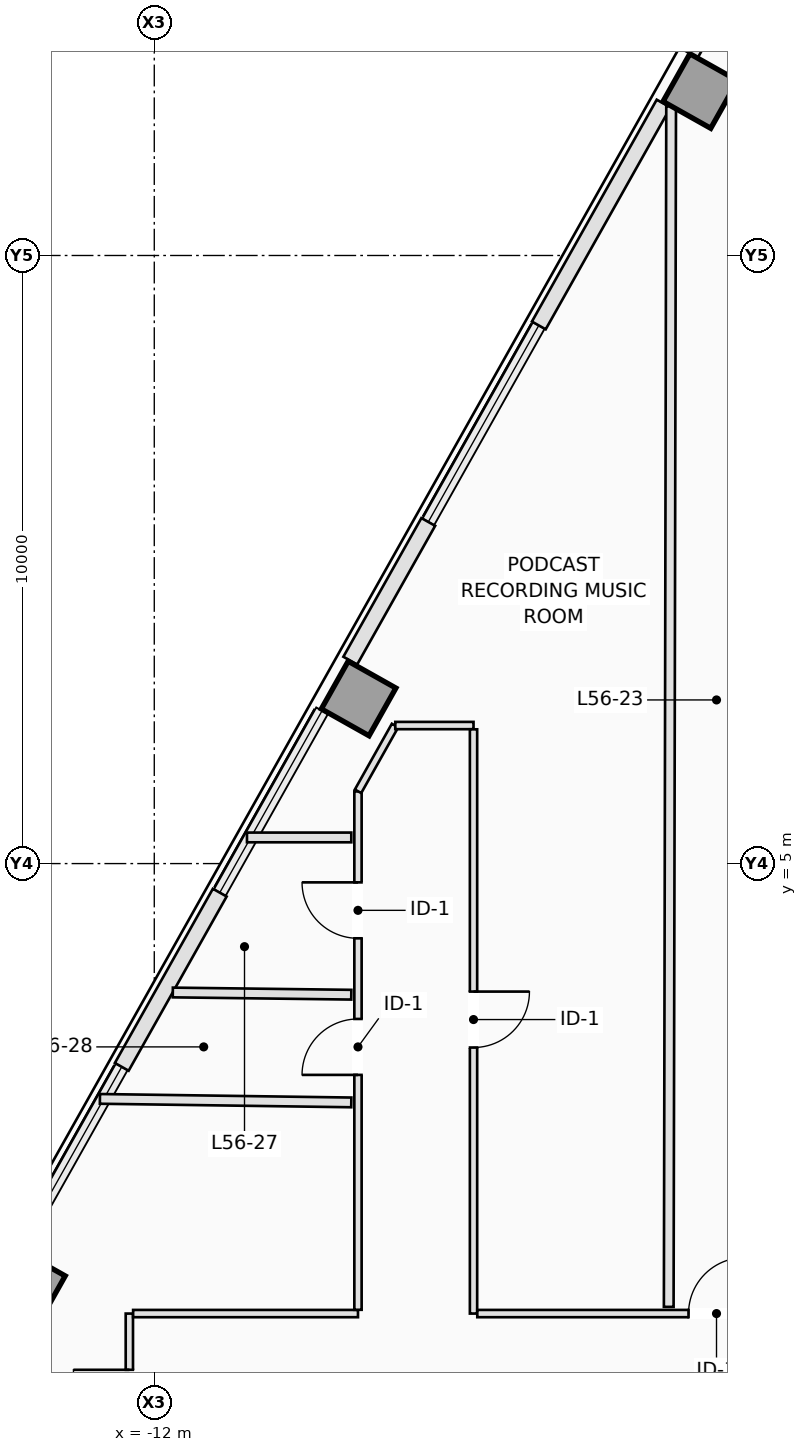
"""IFC4 building model, lengths in metres.
Left out: names, types, materials, properties, quantities, classifications, styles, units other than length and angle.
Written with IfcOpenShell. Run it as: python <this file> out.ifc"""

import sys

from ifc_helpers import new_model, si_unit, direction, frame, frame_2d, origin, origin_2d, place, context, subcontext, project, spatial, rectangle, extrude, element, fill, save


model = new_model("IFC4")
c1 = context("Model", 3, precision=1e-05, world=origin(), true_north=direction((0.0, 1.0)))
c2 = subcontext(c1, "Body", "Model", "MODEL_VIEW")
j1 = project(units=[si_unit("LENGTHUNIT", "METRE"), si_unit("PLANEANGLEUNIT", "RADIAN")], contexts=[c1])
p1 = place(None, origin())
s1 = spatial("IfcSite", under=j1, at=p1, CompositionType="ELEMENT")
p2 = place(p1, origin())
s2 = spatial("IfcBuilding", under=s1, at=p2, CompositionType="ELEMENT")
p3 = place(p2, frame((0.0, 0.0, 204.4)))
s3 = spatial("IfcBuildingStorey", under=s2, at=p3, CompositionType="ELEMENT", Elevation=204.4)
for number, where, z_axis, x_axis in (
    (1, (-3.021, 17.704, 0.0), (0.0, 0.0, 1.0), (-0.872, 0.49, 0.0)),
    (2, (-8.64, 7.715, 0.0), (0.0, 0.0, 1.0), (-0.872, 0.49, 0.0)),
    (3, (-14.077, -1.952, 0.0), (0.0, 0.0, 1.0), (-0.872, 0.49, 0.0)),
):
    element("IfcColumn", number, at=place(p3, frame(where, z_axis=z_axis, x_axis=x_axis)), inside=s3, PredefinedType="COLUMN", context=c2, shape_type="SweptSolid", body=[
        extrude(rectangle(XDim=0.9, YDim=0.9, at=origin_2d()), origin(), (0.0, 0.0, 1.0), 3.5),
    ])
p4 = place(p3, frame((-3.168, 18.309, 0.0), z_axis=(0.0, 0.0, 1.0), x_axis=(0.490345412687, 0.87152818443, 0.0)))
e4 = element("IfcWall", 4, at=p4, inside=s3, PredefinedType="STANDARD", context=c2, shape_type="SweptSolid", body=[
    extrude(rectangle(XDim=0.964, YDim=0.24, at=frame_2d((0.482, 0.0))), origin(), (0.0, 0.0, 1.0), 3.25),
])
p5 = place(p3, frame((-8.777, 8.337, 0.0), z_axis=(0.0, 0.0, 1.0), x_axis=(0.490301099378, 0.871553114818, 0.0)))
e5 = element("IfcWall", 5, at=p5, inside=s3, PredefinedType="STANDARD", context=c2, shape_type="SweptSolid", body=[
    extrude(rectangle(XDim=2.617, YDim=0.26, at=frame_2d((1.309, 0.0))), origin(), (0.0, 0.0, 1.0), 3.25),
])
p6 = place(p3, frame((-5.677, 13.85, 0.0), z_axis=(0.0, 0.0, 1.0), x_axis=(0.490275081837, 0.87156775074, 0.0)))
e6 = element("IfcWall", 6, at=p6, inside=s3, PredefinedType="STANDARD", context=c2, shape_type="SweptSolid", body=[
    extrude(rectangle(XDim=4.187, YDim=0.26, at=frame_2d((2.094, 0.0))), origin(), (0.0, 0.0, 1.0), 3.25),
])
p7 = place(p3, frame((-12.535, 1.657, 0.0), z_axis=(0.0, 0.0, 1.0), x_axis=(0.490264765862, 0.871573553611, 0.0)))
e7 = element("IfcWall", 7, at=p7, inside=s3, PredefinedType="STANDARD", context=c2, shape_type="SweptSolid", body=[
    extrude(rectangle(XDim=3.287, YDim=0.26, at=frame_2d((1.644, 0.0))), origin(), (0.0, 0.0, 1.0), 3.25),
])
p8 = place(p3, frame((-12.41, -5.073, 0.0), z_axis=(0.0, 0.0, 1.0), x_axis=(0.0, 1.0, 0.0)))
e8 = element("IfcWall", 8, at=p8, inside=s3, PredefinedType="PARTITIONING", context=c2, shape_type="SweptSolid", body=[
    extrude(rectangle(XDim=2.673, YDim=0.12, at=frame_2d((1.336, 0.0))), origin(), (0.0, 0.0, 1.0), 3.25),
])
p9 = place(p8, frame((0.828, 0.0, 0.0)))
e9 = element("IfcOpeningElement", 9, at=p9, cuts=e8, PredefinedType="OPENING", context=c2, shape_type="SweptSolid", body=[
    extrude(rectangle(XDim=0.92, YDim=2.12, at=frame_2d((0.46, 1.06))), frame((0.0, 0.07, 0.0), z_axis=(0.0, -1.0, 0.0), x_axis=(1.0, 0.0, 0.0)), (0.0, 0.0, 1.0), 0.14),
])
p10 = place(p3, frame((-12.348, -2.4, 0.0), z_axis=(0.0, 0.0, 1.0), x_axis=(1.0, 0.0, 0.0)))
e10 = element("IfcWall", 10, at=p10, inside=s3, PredefinedType="PARTITIONING", context=c2, shape_type="SweptSolid", body=[
    extrude(rectangle(XDim=3.698, YDim=0.12, at=frame_2d((1.849, 0.0))), origin(), (0.0, 0.0, 1.0), 3.25),
])
p11 = place(p3, frame((-8.65, -2.338, 0.0), z_axis=(0.0, 0.0, 1.0), x_axis=(0.0, 1.0, 0.0)))
e11 = element("IfcWall", 11, at=p11, inside=s3, PredefinedType="PARTITIONING", context=c2, shape_type="SweptSolid", body=[
    extrude(rectangle(XDim=8.525, YDim=0.12, at=frame_2d((4.262, 0.0))), origin(), (0.0, 0.0, 1.0), 3.25),
])
p12 = place(p11, frame((6.109, 0.0, 0.0)))
e12 = element("IfcOpeningElement", 12, at=p12, cuts=e11, PredefinedType="OPENING", context=c2, shape_type="SweptSolid", body=[
    extrude(rectangle(XDim=0.92, YDim=2.12, at=frame_2d((0.46, 1.06))), frame((0.0, 0.07, 0.0), z_axis=(0.0, -1.0, 0.0), x_axis=(1.0, 0.0, 0.0)), (0.0, 0.0, 1.0), 0.14),
])
p13 = place(p11, frame((3.863, 0.0, 0.0)))
e13 = element("IfcOpeningElement", 13, at=p13, cuts=e11, PredefinedType="OPENING", context=c2, shape_type="SweptSolid", body=[
    extrude(rectangle(XDim=0.92, YDim=2.12, at=frame_2d((0.46, 1.06))), frame((0.0, 0.07, 0.0), z_axis=(0.0, -1.0, 0.0), x_axis=(1.0, 0.0, 0.0)), (0.0, 0.0, 1.0), 0.14),
])
p14 = place(p3, frame((-8.649, 6.189, 0.0), z_axis=(0.0, 0.0, 1.0), x_axis=(0.490298618985, 0.871554510183, 0.0)))
e14 = element("IfcWall", 14, at=p14, inside=s3, PredefinedType="PARTITIONING", context=c2, shape_type="SweptSolid", body=[
    extrude(rectangle(XDim=1.24, YDim=0.12, at=frame_2d((0.62, 0.0))), origin(), (0.0, 0.0, 1.0), 3.25),
])
p15 = place(p3, frame((-8.037, 7.27, 0.0), z_axis=(0.0, 0.0, 1.0), x_axis=(1.0, 0.0, 0.0)))
e15 = element("IfcWall", 15, at=p15, inside=s3, PredefinedType="PARTITIONING", context=c2, shape_type="SweptSolid", body=[
    extrude(rectangle(XDim=1.287, YDim=0.12, at=frame_2d((0.643, 0.0))), origin(), (0.0, 0.0, 1.0), 3.25),
])
p16 = place(p3, frame((-6.75, 7.208, 0.0), z_axis=(0.0, 0.0, 1.0), x_axis=(0.0, -1.0, 0.0)))
e16 = element("IfcWall", 16, at=p16, inside=s3, PredefinedType="PARTITIONING", context=c2, shape_type="SweptSolid", body=[
    extrude(rectangle(XDim=9.608, YDim=0.12, at=frame_2d((4.804, 0.0))), origin(), (0.0, 0.0, 1.0), 3.25),
])
p17 = place(p16, frame((4.313, 0.0, 0.0)))
e17 = element("IfcOpeningElement", 17, at=p17, cuts=e16, PredefinedType="OPENING", context=c2, shape_type="SweptSolid", body=[
    extrude(rectangle(XDim=0.92, YDim=2.12, at=frame_2d((0.46, 1.06))), frame((0.0, 0.07, 0.0), z_axis=(0.0, -1.0, 0.0), x_axis=(1.0, 0.0, 0.0)), (0.0, 0.0, 1.0), 0.14),
])
p18 = place(p3, frame((-6.688, -2.4, 0.0), z_axis=(0.0, 0.0, 1.0), x_axis=(1.0, 0.0, 0.0)))
e18 = element("IfcWall", 18, at=p18, inside=s3, PredefinedType="PARTITIONING", context=c2, shape_type="SweptSolid", body=[
    extrude(rectangle(XDim=7.926, YDim=0.12, at=frame_2d((3.963, 0.0))), origin(), (0.0, 0.0, 1.0), 2.943),
])
p19 = place(p18, frame((3.474, 0.0, 0.0)))
e19 = element("IfcOpeningElement", 19, at=p19, cuts=e18, PredefinedType="OPENING", context=c2, shape_type="SweptSolid", body=[
    extrude(rectangle(XDim=0.92, YDim=2.12, at=frame_2d((0.46, 1.06))), frame((0.0, 0.07, 0.0), z_axis=(0.0, -1.0, 0.0), x_axis=(1.0, 0.0, 0.0)), (0.0, 0.0, 1.0), 0.14),
])
p20 = place(p18, frame((5.854, 0.0, 0.0)))
e20 = element("IfcOpeningElement", 20, at=p20, cuts=e18, PredefinedType="OPENING", context=c2, shape_type="SweptSolid", body=[
    extrude(rectangle(XDim=0.92, YDim=2.12, at=frame_2d((0.46, 1.06))), frame((0.0, 0.07, 0.0), z_axis=(0.0, -1.0, 0.0), x_axis=(1.0, 0.0, 0.0)), (0.0, 0.0, 1.0), 0.14),
])
p21 = place(p3, frame((-3.54, -2.29, 0.0), z_axis=(0.0, 0.0, 1.0), x_axis=(0.002003012872, 0.999997993968, 0.0)))
e21 = element("IfcWall", 21, at=p21, inside=s3, PredefinedType="PARTITIONING", context=c2, shape_type="SweptSolid", body=[
    extrude(rectangle(XDim=19.746, YDim=0.16, at=frame_2d((9.873, 0.0))), origin(), (0.0, 0.0, 1.0), 2.722),
])
p22 = place(p3, frame((-8.76, 5.43, 0.0), z_axis=(0.0, 0.0, 1.0), x_axis=(-1.0, 0.0, 0.0)))
e22 = element("IfcWall", 22, at=p22, inside=s3, PredefinedType="PARTITIONING", context=c2, shape_type="SweptSolid", body=[
    extrude(rectangle(XDim=1.716, YDim=0.16, at=frame_2d((0.858, 0.0))), origin(), (0.0, 0.0, 1.0), 3.25),
])
p23 = place(p3, frame((-8.76, 2.844, 0.0), z_axis=(0.0, 0.0, 1.0), x_axis=(-0.999923216691, 0.012391962013, 0.0)))
e23 = element("IfcWall", 23, at=p23, inside=s3, PredefinedType="PARTITIONING", context=c2, shape_type="SweptSolid", body=[
    extrude(rectangle(XDim=2.936, YDim=0.16, at=frame_2d((1.468, 0.0))), origin(), (0.0, 0.0, 1.0), 3.25),
])
p24 = place(p3, frame((-8.76, 1.073, 0.0), z_axis=(0.0, 0.0, 1.0), x_axis=(-0.999901237572, 0.014054006646, 0.0)))
e24 = element("IfcWall", 24, at=p24, inside=s3, PredefinedType="PARTITIONING", context=c2, shape_type="SweptSolid", body=[
    extrude(rectangle(XDim=4.135, YDim=0.16, at=frame_2d((2.067, 0.0))), origin(), (0.0, 0.0, 1.0), 3.25),
])
p25 = place(p19, origin())
e25 = element("IfcDoor", 25, at=p25, inside=s3, OperationType="SINGLE_SWING_RIGHT", PredefinedType="DOOR", context=c2, shape_type="SweptSolid", body=[
    extrude(rectangle(XDim=0.92, YDim=2.12, at=frame_2d((0.46, 1.06))), frame((0.0, 0.025, 0.0), z_axis=(0.0, -1.0, 0.0), x_axis=(1.0, 0.0, 0.0)), (0.0, 0.0, 1.0), 0.05),
])
fill(e19, e25)
p26 = place(p17, origin())
e26 = element("IfcDoor", 26, at=p26, inside=s3, OperationType="SINGLE_SWING_LEFT", PredefinedType="DOOR", context=c2, shape_type="SweptSolid", body=[
    extrude(rectangle(XDim=0.92, YDim=2.12, at=frame_2d((0.46, 1.06))), frame((0.0, 0.025, 0.0), z_axis=(0.0, -1.0, 0.0), x_axis=(1.0, 0.0, 0.0)), (0.0, 0.0, 1.0), 0.05),
])
fill(e17, e26)
p27 = place(p12, origin())
e27 = element("IfcDoor", 27, at=p27, inside=s3, OperationType="SINGLE_SWING_RIGHT", PredefinedType="DOOR", context=c2, shape_type="SweptSolid", body=[
    extrude(rectangle(XDim=0.92, YDim=2.12, at=frame_2d((0.46, 1.06))), frame((0.0, 0.025, 0.0), z_axis=(0.0, -1.0, 0.0), x_axis=(1.0, 0.0, 0.0)), (0.0, 0.0, 1.0), 0.05),
])
fill(e12, e27)
p28 = place(p13, origin())
e28 = element("IfcDoor", 28, at=p28, inside=s3, OperationType="SINGLE_SWING_LEFT", PredefinedType="DOOR", context=c2, shape_type="SweptSolid", body=[
    extrude(rectangle(XDim=0.92, YDim=2.12, at=frame_2d((0.46, 1.06))), frame((0.0, 0.025, 0.0), z_axis=(0.0, -1.0, 0.0), x_axis=(1.0, 0.0, 0.0)), (0.0, 0.0, 1.0), 0.05),
])
fill(e13, e28)
p29 = place(p9, origin())
e29 = element("IfcDoor", 29, at=p29, inside=s3, OperationType="SINGLE_SWING_RIGHT", PredefinedType="DOOR", context=c2, shape_type="SweptSolid", body=[
    extrude(rectangle(XDim=0.92, YDim=2.12, at=frame_2d((0.46, 1.06))), frame((0.0, 0.025, 0.0), z_axis=(0.0, -1.0, 0.0), x_axis=(1.0, 0.0, 0.0)), (0.0, 0.0, 1.0), 0.05),
])
fill(e9, e29)
save(model, sys.argv[1])
